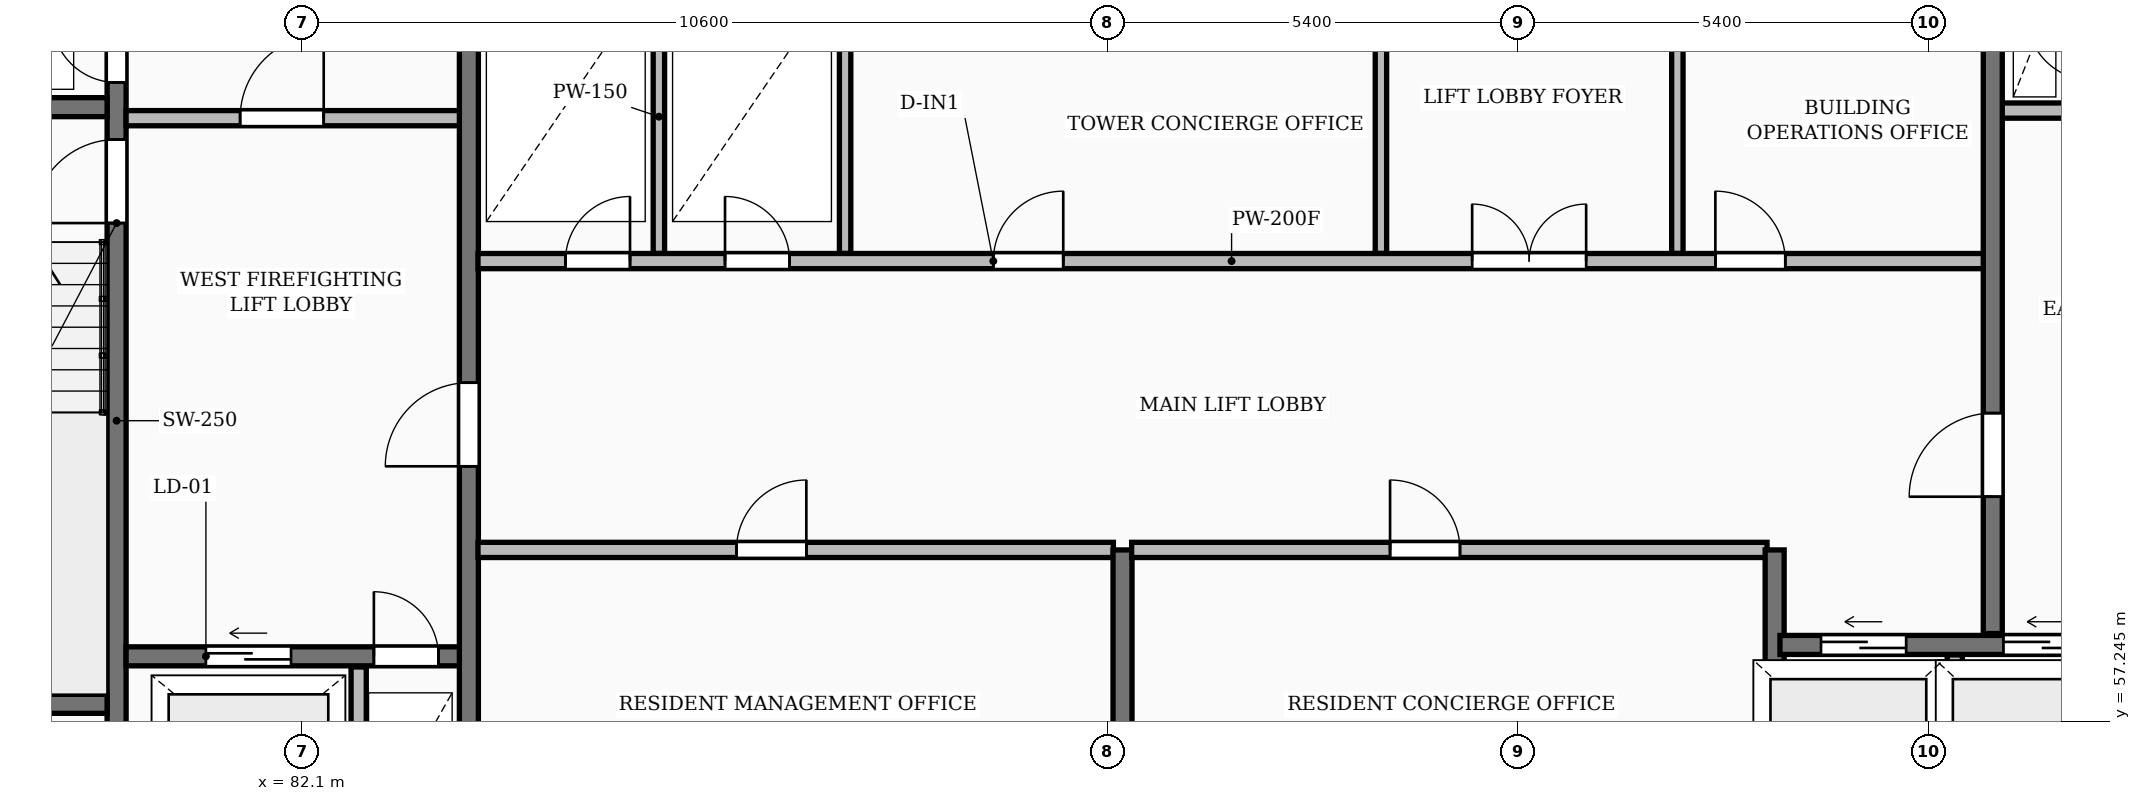
"""IFC4 building model, lengths in metres.
Left out: names, types, materials, properties, quantities, classifications, styles, units other than length and angle.
Written with IfcOpenShell. Run it as: python <this file> out.ifc"""

import sys

from ifc_helpers import new_model, si_unit, direction, frame, frame_2d, origin, place, context, subcontext, project, spatial, rectangle, extrude, element, fill, save


model = new_model("IFC4")
c1 = context("Model", 3, precision=1e-05, world=origin(), true_north=direction((0.0, 1.0)))
c2 = subcontext(c1, "Body", "Model", "MODEL_VIEW")
j1 = project(units=[si_unit("LENGTHUNIT", "METRE"), si_unit("PLANEANGLEUNIT", "RADIAN")], contexts=[c1])
p1 = place(None, origin())
s1 = spatial("IfcSite", under=j1, at=p1, CompositionType="ELEMENT")
p2 = place(p1, origin())
s2 = spatial("IfcBuilding", under=s1, at=p2, CompositionType="ELEMENT")
p3 = place(p2, frame((0.0, 0.0, 217.35)))
s3 = spatial("IfcBuildingStorey", under=s2, at=p3, CompositionType="ELEMENT", Elevation=217.35)
p4 = place(p3, frame((79.665, 55.4, 0.0), z_axis=(0.0, 0.0, 1.0), x_axis=(0.0, 1.0, 0.0)))
e1 = element("IfcWall", 1, at=p4, inside=s3, PredefinedType="SHEAR", context=c2, shape_type="SweptSolid", body=[
    extrude(rectangle(XDim=11.6, YDim=0.25, at=frame_2d((5.8, 0.0))), origin(), (0.0, 0.0, 1.0), 3.25),
])
p5 = place(p4, frame((0.55, 0.0, 0.0)))
e2 = element("IfcOpeningElement", 2, at=p5, cuts=e1, PredefinedType="OPENING", context=c2, shape_type="SweptSolid", body=[
    extrude(rectangle(XDim=0.85, YDim=2.05, at=frame_2d((0.425, 1.025))), frame((0.0, 0.135, 0.0), z_axis=(0.0, -1.0, 0.0), x_axis=(1.0, 0.0, 0.0)), (0.0, 0.0, 1.0), 0.27),
])
p6 = place(p4, frame((8.4, 0.0, 0.0)))
e3 = element("IfcOpeningElement", 3, at=p6, cuts=e1, PredefinedType="OPENING", context=c2, shape_type="SweptSolid", body=[
    extrude(rectangle(XDim=1.1, YDim=2.1, at=frame_2d((0.55, 1.05))), frame((0.0, 0.135, 0.0), z_axis=(0.0, -1.0, 0.0), x_axis=(1.0, 0.0, 0.0)), (0.0, 0.0, 1.0), 0.27),
])
p7 = place(p4, frame((10.25, 0.0, 0.0)))
e4 = element("IfcOpeningElement", 4, at=p7, cuts=e1, PredefinedType="OPENING", context=c2, shape_type="SweptSolid", body=[
    extrude(rectangle(XDim=0.85, YDim=2.05, at=frame_2d((0.425, 1.025))), frame((0.0, 0.135, 0.0), z_axis=(0.0, -1.0, 0.0), x_axis=(1.0, 0.0, 0.0)), (0.0, 0.0, 1.0), 0.27),
])
for number, where, z_axis, x_axis in (
    (5, (76.3, 57.475, 0.0), (0.0, 0.0, 1.0), (1.0, 0.0, 0.0)),
    (6, (76.3, 65.325, 0.0), (0.0, 0.0, 1.0), (1.0, 0.0, 0.0)),
):
    element("IfcWall", number, at=place(p3, frame(where, z_axis=z_axis, x_axis=x_axis)), inside=s3, PredefinedType="SHEAR", context=c2, shape_type="SweptSolid", body=[
        extrude(rectangle(XDim=3.24, YDim=0.25, at=frame_2d((1.62, 0.0))), origin(), (0.0, 0.0, 1.0), 3.25),
    ])
p8 = place(p3, frame((79.79, 58.1, 0.0), z_axis=(0.0, 0.0, 1.0), x_axis=(1.0, 0.0, 0.0)))
e7 = element("IfcWall", 7, at=p8, inside=s3, PredefinedType="SHEAR", context=c2, shape_type="SweptSolid", body=[
    extrude(rectangle(XDim=4.39, YDim=0.25, at=frame_2d((2.195, 0.0))), origin(), (0.0, 0.0, 1.0), 3.25),
])
p9 = place(p8, frame((1.05, 0.0, 0.0)))
e8 = element("IfcOpeningElement", 8, at=p9, cuts=e7, PredefinedType="OPENING", context=c2, shape_type="SweptSolid", body=[
    extrude(rectangle(XDim=1.12, YDim=2.12, at=frame_2d((0.56, 1.06))), frame((0.0, 0.135, 0.0), z_axis=(0.0, -1.0, 0.0), x_axis=(1.0, 0.0, 0.0)), (0.0, 0.0, 1.0), 0.27),
])
p10 = place(p8, frame((3.26, 0.0, 0.0)))
e9 = element("IfcOpeningElement", 9, at=p10, cuts=e7, PredefinedType="OPENING", context=c2, shape_type="SweptSolid", body=[
    extrude(rectangle(XDim=0.85, YDim=2.05, at=frame_2d((0.425, 1.025))), frame((0.0, 0.135, 0.0), z_axis=(0.0, -1.0, 0.0), x_axis=(1.0, 0.0, 0.0)), (0.0, 0.0, 1.0), 0.27),
])
p11 = place(p3, frame((82.85, 55.4, 0.0), z_axis=(0.0, 0.0, 1.0), x_axis=(0.0, 1.0, 0.0)))
e10 = element("IfcWall", 10, at=p11, inside=s3, PredefinedType="PARTITIONING", context=c2, shape_type="SweptSolid", body=[
    extrude(rectangle(XDim=2.56, YDim=0.2, at=frame_2d((1.28, 0.0))), origin(), (0.0, 0.0, 1.0), 2.97),
])
p12 = place(p3, frame((79.79, 65.18, 0.0), z_axis=(0.0, 0.0, 1.0), x_axis=(1.0, 0.0, 0.0)))
e11 = element("IfcWall", 11, at=p12, inside=s3, PredefinedType="PARTITIONING", context=c2, shape_type="SweptSolid", body=[
    extrude(rectangle(XDim=4.39, YDim=0.2, at=frame_2d((2.195, 0.0))), origin(), (0.0, 0.0, 1.0), 2.97),
])
p13 = place(p12, frame((1.5, 0.0, 0.0)))
e12 = element("IfcOpeningElement", 12, at=p13, cuts=e11, PredefinedType="OPENING", context=c2, shape_type="SweptSolid", body=[
    extrude(rectangle(XDim=1.1, YDim=2.1, at=frame_2d((0.55, 1.05))), frame((0.0, 0.11, 0.0), z_axis=(0.0, -1.0, 0.0), x_axis=(1.0, 0.0, 0.0)), (0.0, 0.0, 1.0), 0.22),
])
p14 = place(p3, frame((84.3, 55.4, 0.0), z_axis=(0.0, 0.0, 1.0), x_axis=(0.0, 1.0, 0.0)))
e13 = element("IfcWall", 13, at=p14, inside=s3, PredefinedType="SHEAR", context=c2, shape_type="SweptSolid", body=[
    extrude(rectangle(XDim=11.6, YDim=0.25, at=frame_2d((5.8, 0.0))), origin(), (0.0, 0.0, 1.0), 3.25),
])
p15 = place(p14, frame((5.2, 0.0, 0.0)))
e14 = element("IfcOpeningElement", 14, at=p15, cuts=e13, PredefinedType="OPENING", context=c2, shape_type="SweptSolid", body=[
    extrude(rectangle(XDim=1.1, YDim=2.1, at=frame_2d((0.55, 1.05))), frame((0.0, 0.135, 0.0), z_axis=(0.0, -1.0, 0.0), x_axis=(1.0, 0.0, 0.0)), (0.0, 0.0, 1.0), 0.27),
])
p16 = place(p3, frame((84.42, 59.5, 0.0), z_axis=(0.0, 0.0, 1.0), x_axis=(1.0, 0.0, 0.0)))
e15 = element("IfcWall", 15, at=p16, inside=s3, PredefinedType="PARTITIONING", context=c2, shape_type="SweptSolid", body=[
    extrude(rectangle(XDim=8.36, YDim=0.2, at=frame_2d((4.18, 0.0))), origin(), (0.0, 0.0, 1.0), 2.97),
])
p17 = place(p16, frame((3.4, 0.0, 0.0)))
e16 = element("IfcOpeningElement", 16, at=p17, cuts=e15, PredefinedType="OPENING", context=c2, shape_type="SweptSolid", body=[
    extrude(rectangle(XDim=0.92, YDim=2.08, at=frame_2d((0.46, 1.04))), frame((0.0, 0.11, 0.0), z_axis=(0.0, -1.0, 0.0), x_axis=(1.0, 0.0, 0.0)), (0.0, 0.0, 1.0), 0.22),
])
p18 = place(p3, frame((92.9, 55.4, 0.0), z_axis=(0.0, 0.0, 1.0), x_axis=(0.0, 1.0, 0.0)))
e17 = element("IfcWall", 17, at=p18, inside=s3, PredefinedType="SHEAR", context=c2, shape_type="SweptSolid", body=[
    extrude(rectangle(XDim=4.1, YDim=0.25, at=frame_2d((2.05, 0.0))), origin(), (0.0, 0.0, 1.0), 3.25),
])
p19 = place(p3, frame((93.02, 59.5, 0.0), z_axis=(0.0, 0.0, 1.0), x_axis=(1.0, 0.0, 0.0)))
e18 = element("IfcWall", 18, at=p19, inside=s3, PredefinedType="PARTITIONING", context=c2, shape_type="SweptSolid", body=[
    extrude(rectangle(XDim=8.36, YDim=0.2, at=frame_2d((4.18, 0.0))), origin(), (0.0, 0.0, 1.0), 2.97),
])
p20 = place(p19, frame((3.4, 0.0, 0.0)))
e19 = element("IfcOpeningElement", 19, at=p20, cuts=e18, PredefinedType="OPENING", context=c2, shape_type="SweptSolid", body=[
    extrude(rectangle(XDim=0.92, YDim=2.08, at=frame_2d((0.46, 1.04))), frame((0.0, 0.11, 0.0), z_axis=(0.0, -1.0, 0.0), x_axis=(1.0, 0.0, 0.0)), (0.0, 0.0, 1.0), 0.22),
])
p21 = place(p3, frame((101.48, 55.4, 0.0), z_axis=(0.0, 0.0, 1.0), x_axis=(0.0, 1.0, 0.0)))
e20 = element("IfcWall", 20, at=p21, inside=s3, PredefinedType="SHEAR", context=c2, shape_type="SweptSolid", body=[
    extrude(rectangle(XDim=4.1, YDim=0.25, at=frame_2d((2.05, 0.0))), origin(), (0.0, 0.0, 1.0), 3.25),
])
p22 = place(p3, frame((103.85, 55.4, 0.0), z_axis=(0.0, 0.0, 1.0), x_axis=(0.0, 1.0, 0.0)))
e21 = element("IfcWall", 21, at=p22, inside=s3, PredefinedType="PARTITIONING", context=c2, shape_type="SweptSolid", body=[
    extrude(rectangle(XDim=2.72, YDim=0.2, at=frame_2d((1.36, 0.0))), origin(), (0.0, 0.0, 1.0), 2.97),
])
p23 = place(p3, frame((101.55, 58.25, 0.0), z_axis=(0.0, 0.0, 1.0), x_axis=(1.0, 0.0, 0.0)))
e22 = element("IfcWall", 22, at=p23, inside=s3, PredefinedType="SHEAR", context=c2, shape_type="SweptSolid", body=[
    extrude(rectangle(XDim=4.6, YDim=0.25, at=frame_2d((2.3, 0.0))), origin(), (0.0, 0.0, 1.0), 3.25),
])
p24 = place(p23, frame((0.54, 0.0, 0.0)))
e23 = element("IfcOpeningElement", 23, at=p24, cuts=e22, PredefinedType="OPENING", context=c2, shape_type="SweptSolid", body=[
    extrude(rectangle(XDim=1.12, YDim=2.12, at=frame_2d((0.56, 1.06))), frame((0.0, 0.135, 0.0), z_axis=(0.0, -1.0, 0.0), x_axis=(1.0, 0.0, 0.0)), (0.0, 0.0, 1.0), 0.27),
])
p25 = place(p23, frame((2.94, 0.0, 0.0)))
e24 = element("IfcOpeningElement", 24, at=p25, cuts=e22, PredefinedType="OPENING", context=c2, shape_type="SweptSolid", body=[
    extrude(rectangle(XDim=1.12, YDim=2.12, at=frame_2d((0.56, 1.06))), frame((0.0, 0.135, 0.0), z_axis=(0.0, -1.0, 0.0), x_axis=(1.0, 0.0, 0.0)), (0.0, 0.0, 1.0), 0.27),
])
for number, where, z_axis, x_axis in (
    (25, (86.8, 63.4, 0.0), (0.0, 0.0, 1.0), (0.0, 1.0, 0.0)),
    (26, (89.25, 63.4, 0.0), (0.0, 0.0, 1.0), (0.0, 1.0, 0.0)),
    (27, (96.3, 63.4, 0.0), (0.0, 0.0, 1.0), (0.0, 1.0, 0.0)),
    (28, (100.2, 63.4, 0.0), (0.0, 0.0, 1.0), (0.0, 1.0, 0.0)),
):
    element("IfcWall", number, at=place(p3, frame(where, z_axis=z_axis, x_axis=x_axis)), inside=s3, PredefinedType="PARTITIONING", context=c2, shape_type="SweptSolid", body=[
        extrude(rectangle(XDim=3.6, YDim=0.15, at=frame_2d((1.8, 0.0))), origin(), (0.0, 0.0, 1.0), 2.97),
    ])
p26 = place(p3, frame((84.42, 63.3, 0.0), z_axis=(0.0, 0.0, 1.0), x_axis=(1.0, 0.0, 0.0)))
e29 = element("IfcWall", 29, at=p26, inside=s3, PredefinedType="PARTITIONING", context=c2, shape_type="SweptSolid", body=[
    extrude(rectangle(XDim=19.83, YDim=0.2, at=frame_2d((9.915, 0.0))), origin(), (0.0, 0.0, 1.0), 2.97),
])
p27 = place(p26, frame((1.15, 0.0, 0.0)))
e30 = element("IfcOpeningElement", 30, at=p27, cuts=e29, PredefinedType="OPENING", context=c2, shape_type="SweptSolid", body=[
    extrude(rectangle(XDim=0.85, YDim=2.05, at=frame_2d((0.425, 1.025))), frame((0.0, 0.11, 0.0), z_axis=(0.0, -1.0, 0.0), x_axis=(1.0, 0.0, 0.0)), (0.0, 0.0, 1.0), 0.22),
])
p28 = place(p26, frame((3.25, 0.0, 0.0)))
e31 = element("IfcOpeningElement", 31, at=p28, cuts=e29, PredefinedType="OPENING", context=c2, shape_type="SweptSolid", body=[
    extrude(rectangle(XDim=0.85, YDim=2.05, at=frame_2d((0.425, 1.025))), frame((0.0, 0.11, 0.0), z_axis=(0.0, -1.0, 0.0), x_axis=(1.0, 0.0, 0.0)), (0.0, 0.0, 1.0), 0.22),
])
p29 = place(p26, frame((13.08, 0.0, 0.0)))
e32 = element("IfcOpeningElement", 32, at=p29, cuts=e29, PredefinedType="OPENING", context=c2, shape_type="SweptSolid", body=[
    extrude(rectangle(XDim=1.5, YDim=2.2, at=frame_2d((0.75, 1.1))), frame((0.0, 0.11, 0.0), z_axis=(0.0, -1.0, 0.0), x_axis=(1.0, 0.0, 0.0)), (0.0, 0.0, 1.0), 0.22),
])
p30 = place(p26, frame((6.78, 0.0, 0.0)))
e33 = element("IfcOpeningElement", 33, at=p30, cuts=e29, PredefinedType="OPENING", context=c2, shape_type="SweptSolid", body=[
    extrude(rectangle(XDim=0.92, YDim=2.08, at=frame_2d((0.46, 1.04))), frame((0.0, 0.11, 0.0), z_axis=(0.0, -1.0, 0.0), x_axis=(1.0, 0.0, 0.0)), (0.0, 0.0, 1.0), 0.22),
])
p31 = place(p26, frame((16.28, 0.0, 0.0)))
e34 = element("IfcOpeningElement", 34, at=p31, cuts=e29, PredefinedType="OPENING", context=c2, shape_type="SweptSolid", body=[
    extrude(rectangle(XDim=0.92, YDim=2.08, at=frame_2d((0.46, 1.04))), frame((0.0, 0.11, 0.0), z_axis=(0.0, -1.0, 0.0), x_axis=(1.0, 0.0, 0.0)), (0.0, 0.0, 1.0), 0.22),
])
p32 = place(p3, frame((104.45, 65.28, 0.0), z_axis=(0.0, 0.0, 1.0), x_axis=(1.0, 0.0, 0.0)))
e35 = element("IfcWall", 35, at=p32, inside=s3, PredefinedType="PARTITIONING", context=c2, shape_type="SweptSolid", body=[
    extrude(rectangle(XDim=1.2, YDim=0.2, at=frame_2d((0.6, 0.0))), origin(), (0.0, 0.0, 1.0), 2.97),
])
p33 = place(p3, frame((104.35, 58.4, 0.0), z_axis=(0.0, 0.0, 1.0), x_axis=(0.0, 1.0, 0.0)))
e36 = element("IfcWall", 36, at=p33, inside=s3, PredefinedType="SHEAR", context=c2, shape_type="SweptSolid", body=[
    extrude(rectangle(XDim=8.6, YDim=0.25, at=frame_2d((4.3, 0.0))), origin(), (0.0, 0.0, 1.0), 3.25),
])
p34 = place(p33, frame((1.8, 0.0, 0.0)))
e37 = element("IfcOpeningElement", 37, at=p34, cuts=e36, PredefinedType="OPENING", context=c2, shape_type="SweptSolid", body=[
    extrude(rectangle(XDim=1.1, YDim=2.1, at=frame_2d((0.55, 1.05))), frame((0.0, 0.135, 0.0), z_axis=(0.0, -1.0, 0.0), x_axis=(1.0, 0.0, 0.0)), (0.0, 0.0, 1.0), 0.27),
])
p35 = place(p6, origin())
e38 = element("IfcDoor", 38, at=p35, inside=s3, OperationType="SINGLE_SWING_LEFT", PredefinedType="DOOR", context=c2, shape_type="SweptSolid", body=[
    extrude(rectangle(XDim=1.1, YDim=2.1, at=frame_2d((0.55, 1.05))), frame((0.0, 0.025, 0.0), z_axis=(0.0, -1.0, 0.0), x_axis=(1.0, 0.0, 0.0)), (0.0, 0.0, 1.0), 0.05),
])
fill(e3, e38)
p36 = place(p7, origin())
e39 = element("IfcDoor", 39, at=p36, inside=s3, OperationType="SINGLE_SWING_RIGHT", PredefinedType="DOOR", context=c2, shape_type="SweptSolid", body=[
    extrude(rectangle(XDim=0.85, YDim=2.05, at=frame_2d((0.425, 1.025))), frame((0.0, 0.025, 0.0), z_axis=(0.0, -1.0, 0.0), x_axis=(1.0, 0.0, 0.0)), (0.0, 0.0, 1.0), 0.05),
])
fill(e4, e39)
p37 = place(p9, origin())
e40 = element("IfcDoor", 40, at=p37, inside=s3, OperationType="SLIDING_TO_LEFT", PredefinedType="DOOR", context=c2, shape_type="SweptSolid", body=[
    extrude(rectangle(XDim=1.12, YDim=2.12, at=frame_2d((0.56, 1.06))), frame((0.0, 0.025, 0.0), z_axis=(0.0, -1.0, 0.0), x_axis=(1.0, 0.0, 0.0)), (0.0, 0.0, 1.0), 0.05),
])
fill(e8, e40)
p38 = place(p10, origin())
e41 = element("IfcDoor", 41, at=p38, inside=s3, OperationType="SINGLE_SWING_LEFT", PredefinedType="DOOR", context=c2, shape_type="SweptSolid", body=[
    extrude(rectangle(XDim=0.85, YDim=2.05, at=frame_2d((0.425, 1.025))), frame((0.0, 0.025, 0.0), z_axis=(0.0, -1.0, 0.0), x_axis=(1.0, 0.0, 0.0)), (0.0, 0.0, 1.0), 0.05),
])
fill(e9, e41)
p39 = place(p13, origin())
e42 = element("IfcDoor", 42, at=p39, inside=s3, OperationType="SINGLE_SWING_RIGHT", PredefinedType="DOOR", context=c2, shape_type="SweptSolid", body=[
    extrude(rectangle(XDim=1.1, YDim=2.1, at=frame_2d((0.55, 1.05))), frame((0.0, 0.025, 0.0), z_axis=(0.0, -1.0, 0.0), x_axis=(1.0, 0.0, 0.0)), (0.0, 0.0, 1.0), 0.05),
])
fill(e12, e42)
p40 = place(p15, origin())
e43 = element("IfcDoor", 43, at=p40, inside=s3, OperationType="SINGLE_SWING_LEFT", PredefinedType="DOOR", context=c2, shape_type="SweptSolid", body=[
    extrude(rectangle(XDim=1.1, YDim=2.1, at=frame_2d((0.55, 1.05))), frame((0.0, 0.025, 0.0), z_axis=(0.0, -1.0, 0.0), x_axis=(1.0, 0.0, 0.0)), (0.0, 0.0, 1.0), 0.05),
])
fill(e14, e43)
p41 = place(p17, origin())
e44 = element("IfcDoor", 44, at=p41, inside=s3, OperationType="SINGLE_SWING_RIGHT", PredefinedType="DOOR", context=c2, shape_type="SweptSolid", body=[
    extrude(rectangle(XDim=0.92, YDim=2.08, at=frame_2d((0.46, 1.04))), frame((0.0, 0.025, 0.0), z_axis=(0.0, -1.0, 0.0), x_axis=(1.0, 0.0, 0.0)), (0.0, 0.0, 1.0), 0.05),
])
fill(e16, e44)
p42 = place(p20, origin())
e45 = element("IfcDoor", 45, at=p42, inside=s3, OperationType="SINGLE_SWING_LEFT", PredefinedType="DOOR", context=c2, shape_type="SweptSolid", body=[
    extrude(rectangle(XDim=0.92, YDim=2.08, at=frame_2d((0.46, 1.04))), frame((0.0, 0.025, 0.0), z_axis=(0.0, -1.0, 0.0), x_axis=(1.0, 0.0, 0.0)), (0.0, 0.0, 1.0), 0.05),
])
fill(e19, e45)
p43 = place(p24, origin())
e46 = element("IfcDoor", 46, at=p43, inside=s3, OperationType="SLIDING_TO_LEFT", PredefinedType="DOOR", context=c2, shape_type="SweptSolid", body=[
    extrude(rectangle(XDim=1.12, YDim=2.12, at=frame_2d((0.56, 1.06))), frame((0.0, 0.025, 0.0), z_axis=(0.0, -1.0, 0.0), x_axis=(1.0, 0.0, 0.0)), (0.0, 0.0, 1.0), 0.05),
])
fill(e23, e46)
p44 = place(p25, origin())
e47 = element("IfcDoor", 47, at=p44, inside=s3, OperationType="SLIDING_TO_LEFT", PredefinedType="DOOR", context=c2, shape_type="SweptSolid", body=[
    extrude(rectangle(XDim=1.12, YDim=2.12, at=frame_2d((0.56, 1.06))), frame((0.0, 0.025, 0.0), z_axis=(0.0, -1.0, 0.0), x_axis=(1.0, 0.0, 0.0)), (0.0, 0.0, 1.0), 0.05),
])
fill(e24, e47)
p45 = place(p27, origin())
e48 = element("IfcDoor", 48, at=p45, inside=s3, OperationType="SINGLE_SWING_RIGHT", PredefinedType="DOOR", context=c2, shape_type="SweptSolid", body=[
    extrude(rectangle(XDim=0.85, YDim=2.05, at=frame_2d((0.425, 1.025))), frame((0.0, 0.025, 0.0), z_axis=(0.0, -1.0, 0.0), x_axis=(1.0, 0.0, 0.0)), (0.0, 0.0, 1.0), 0.05),
])
fill(e30, e48)
p46 = place(p28, origin())
e49 = element("IfcDoor", 49, at=p46, inside=s3, OperationType="SINGLE_SWING_LEFT", PredefinedType="DOOR", context=c2, shape_type="SweptSolid", body=[
    extrude(rectangle(XDim=0.85, YDim=2.05, at=frame_2d((0.425, 1.025))), frame((0.0, 0.025, 0.0), z_axis=(0.0, -1.0, 0.0), x_axis=(1.0, 0.0, 0.0)), (0.0, 0.0, 1.0), 0.05),
])
fill(e31, e49)
p47 = place(p29, origin())
e50 = element("IfcDoor", 50, at=p47, inside=s3, OperationType="DOUBLE_DOOR_SINGLE_SWING", PredefinedType="DOOR", context=c2, shape_type="SweptSolid", body=[
    extrude(rectangle(XDim=1.5, YDim=2.2, at=frame_2d((0.75, 1.1))), frame((0.0, 0.025, 0.0), z_axis=(0.0, -1.0, 0.0), x_axis=(1.0, 0.0, 0.0)), (0.0, 0.0, 1.0), 0.05),
])
fill(e32, e50)
p48 = place(p30, origin())
e51 = element("IfcDoor", 51, at=p48, inside=s3, OperationType="SINGLE_SWING_RIGHT", PredefinedType="DOOR", context=c2, shape_type="SweptSolid", body=[
    extrude(rectangle(XDim=0.92, YDim=2.08, at=frame_2d((0.46, 1.04))), frame((0.0, 0.025, 0.0), z_axis=(0.0, -1.0, 0.0), x_axis=(1.0, 0.0, 0.0)), (0.0, 0.0, 1.0), 0.05),
])
fill(e33, e51)
p49 = place(p31, origin())
e52 = element("IfcDoor", 52, at=p49, inside=s3, OperationType="SINGLE_SWING_LEFT", PredefinedType="DOOR", context=c2, shape_type="SweptSolid", body=[
    extrude(rectangle(XDim=0.92, YDim=2.08, at=frame_2d((0.46, 1.04))), frame((0.0, 0.025, 0.0), z_axis=(0.0, -1.0, 0.0), x_axis=(1.0, 0.0, 0.0)), (0.0, 0.0, 1.0), 0.05),
])
fill(e34, e52)
p50 = place(p34, origin())
e53 = element("IfcDoor", 53, at=p50, inside=s3, OperationType="SINGLE_SWING_LEFT", PredefinedType="DOOR", context=c2, shape_type="SweptSolid", body=[
    extrude(rectangle(XDim=1.1, YDim=2.1, at=frame_2d((0.55, 1.05))), frame((0.0, 0.025, 0.0), z_axis=(0.0, -1.0, 0.0), x_axis=(1.0, 0.0, 0.0)), (0.0, 0.0, 1.0), 0.05),
])
fill(e37, e53)
save(model, sys.argv[1])
